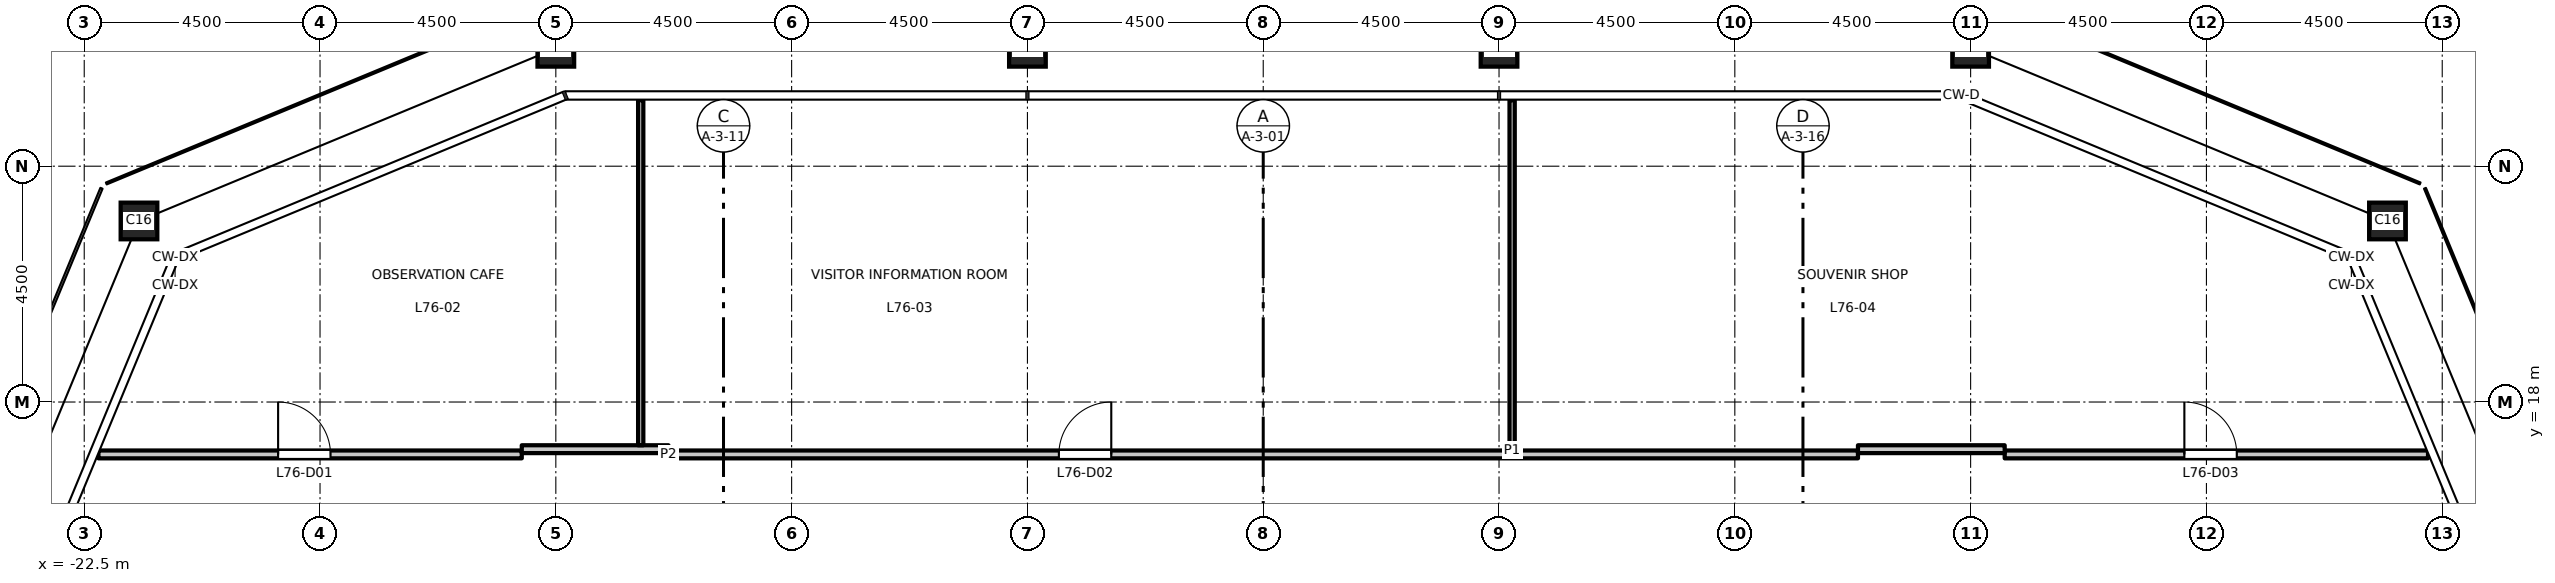
"""IFC4 building model, lengths in metres.
Left out: names, types, materials, properties, quantities, classifications, styles, units other than length and angle.
Written with IfcOpenShell. Run it as: python <this file> out.ifc"""

import sys

from ifc_helpers import new_model, si_unit, direction, frame, frame_2d, origin, origin_2d, place, context, subcontext, project, spatial, rectangle, hollow_rectangle, extrude, element, fill, save


model = new_model("IFC4")
c1 = context("Model", 3, precision=1e-05, world=origin(), true_north=direction((0.0, 1.0)))
c2 = subcontext(c1, "Body", "Model", "MODEL_VIEW")
j1 = project(units=[si_unit("LENGTHUNIT", "METRE"), si_unit("PLANEANGLEUNIT", "RADIAN")], contexts=[c1])
p1 = place(None, origin())
s1 = spatial("IfcSite", under=j1, at=p1, CompositionType="ELEMENT")
p2 = place(p1, origin())
s2 = spatial("IfcBuilding", under=s1, at=p2, CompositionType="ELEMENT")
p3 = place(p2, frame((0.0, 0.0, 353.2)))
s3 = spatial("IfcBuildingStorey", under=s2, at=p3, CompositionType="ELEMENT", Elevation=353.2)
for number, where, z_axis, x_axis in (
    (1, (21.455, 21.455, 0.0), (0.0, 0.0, 1.0), (1.0, 0.0, 0.0)),
    (2, (13.5, 24.75, 0.0), (0.0, 0.0, 1.0), (1.0, 0.0, 0.0)),
    (3, (4.5, 24.75, 0.0), (0.0, 0.0, 1.0), (1.0, 0.0, 0.0)),
    (4, (-4.5, 24.75, 0.0), (0.0, 0.0, 1.0), (1.0, 0.0, 0.0)),
    (5, (-13.5, 24.75, 0.0), (0.0, 0.0, 1.0), (1.0, 0.0, 0.0)),
    (6, (-21.455, 21.455, 0.0), (0.0, 0.0, 1.0), (1.0, 0.0, 0.0)),
):
    element("IfcColumn", number, at=place(p3, frame(where, z_axis=z_axis, x_axis=x_axis)), inside=s3, PredefinedType="COLUMN", context=c2, shape_type="SweptSolid", body=[
        extrude(hollow_rectangle(XDim=0.7, YDim=0.7, WallThickness=0.036, at=origin_2d()), origin(), (0.0, 0.0, 1.0), 5.0),
    ])
p4 = place(p3, frame((-22.229, 17.0, 0.0), z_axis=(0.0, 0.0, 1.0), x_axis=(1.0, 0.0, 0.0)))
e7 = element("IfcWall", 7, at=p4, inside=s3, PredefinedType="PARTITIONING", context=c2, shape_type="SweptSolid", body=[
    extrude(rectangle(XDim=8.079, YDim=0.15, at=frame_2d((4.04, 0.0))), origin(), (0.0, 0.0, 1.0), 4.8),
])
p5 = place(p4, frame((3.429, 0.0, 0.0)))
e8 = element("IfcOpeningElement", 8, at=p5, cuts=e7, PredefinedType="OPENING", context=c2, shape_type="SweptSolid", body=[
    extrude(rectangle(XDim=1.0, YDim=2.1, at=frame_2d((0.5, 1.05))), frame((0.0, 0.085, 0.0), z_axis=(0.0, -1.0, 0.0), x_axis=(1.0, 0.0, 0.0)), (0.0, 0.0, 1.0), 0.17),
])
p6 = place(p3, frame((-11.35, 17.0, 0.0), z_axis=(0.0, 0.0, 1.0), x_axis=(1.0, 0.0, 0.0)))
e9 = element("IfcWall", 9, at=p6, inside=s3, PredefinedType="PARTITIONING", context=c2, shape_type="SweptSolid", body=[
    extrude(rectangle(XDim=22.7, YDim=0.15, at=frame_2d((11.35, 0.0))), origin(), (0.0, 0.0, 1.0), 4.8),
])
p7 = place(p6, frame((7.45, 0.0, 0.0)))
e10 = element("IfcOpeningElement", 10, at=p7, cuts=e9, PredefinedType="OPENING", context=c2, shape_type="SweptSolid", body=[
    extrude(rectangle(XDim=1.0, YDim=2.1, at=frame_2d((0.5, 1.05))), frame((0.0, 0.085, 0.0), z_axis=(0.0, -1.0, 0.0), x_axis=(1.0, 0.0, 0.0)), (0.0, 0.0, 1.0), 0.17),
])
p8 = place(p3, frame((14.15, 17.0, 0.0), z_axis=(0.0, 0.0, 1.0), x_axis=(1.0, 0.0, 0.0)))
e11 = element("IfcWall", 11, at=p8, inside=s3, PredefinedType="PARTITIONING", context=c2, shape_type="SweptSolid", body=[
    extrude(rectangle(XDim=8.079, YDim=0.15, at=frame_2d((4.04, 0.0))), origin(), (0.0, 0.0, 1.0), 4.8),
])
p9 = place(p8, frame((3.429, 0.0, 0.0)))
e12 = element("IfcOpeningElement", 12, at=p9, cuts=e11, PredefinedType="OPENING", context=c2, shape_type="SweptSolid", body=[
    extrude(rectangle(XDim=1.0, YDim=2.1, at=frame_2d((0.5, 1.05))), frame((0.0, 0.085, 0.0), z_axis=(0.0, -1.0, 0.0), x_axis=(1.0, 0.0, 0.0)), (0.0, 0.0, 1.0), 0.17),
])
for number, where, z_axis, x_axis in (
    (13, (-14.15, 17.1, 0.0), (0.0, 0.0, 1.0), (1.0, 0.0, 0.0)),
    (14, (11.35, 17.1, 0.0), (0.0, 0.0, 1.0), (1.0, 0.0, 0.0)),
):
    element("IfcWall", number, at=place(p3, frame(where, z_axis=z_axis, x_axis=x_axis)), inside=s3, PredefinedType="PARTITIONING", context=c2, shape_type="SweptSolid", body=[
        extrude(rectangle(XDim=2.8, YDim=0.15, at=frame_2d((1.4, 0.0))), origin(), (0.0, 0.0, 1.0), 4.8),
    ])
p10 = place(p3, frame((-11.88, 17.175, 0.0), z_axis=(0.0, 0.0, 1.0), x_axis=(0.0, 1.0, 0.0)))
e15 = element("IfcWall", 15, at=p10, inside=s3, PredefinedType="PARTITIONING", context=c2, shape_type="SweptSolid", body=[
    extrude(rectangle(XDim=6.585, YDim=0.1, at=frame_2d((3.292, 0.0))), origin(), (0.0, 0.0, 1.0), 4.8),
])
p11 = place(p3, frame((4.75, 17.075, 0.0), z_axis=(0.0, 0.0, 1.0), x_axis=(0.0, 1.0, 0.0)))
e16 = element("IfcWall", 16, at=p11, inside=s3, PredefinedType="PARTITIONING", context=c2, shape_type="SweptSolid", body=[
    extrude(rectangle(XDim=6.685, YDim=0.1, at=frame_2d((3.343, 0.0))), origin(), (0.0, 0.0, 1.0), 4.8),
])
p12 = place(p5, origin())
e17 = element("IfcDoor", 17, at=p12, inside=s3, OperationType="SINGLE_SWING_LEFT", PredefinedType="DOOR", context=c2, shape_type="SweptSolid", body=[
    extrude(rectangle(XDim=1.0, YDim=2.1, at=frame_2d((0.5, 1.05))), frame((0.0, 0.025, 0.0), z_axis=(0.0, -1.0, 0.0), x_axis=(1.0, 0.0, 0.0)), (0.0, 0.0, 1.0), 0.05),
])
fill(e8, e17)
p13 = place(p7, origin())
e18 = element("IfcDoor", 18, at=p13, inside=s3, OperationType="SINGLE_SWING_RIGHT", PredefinedType="DOOR", context=c2, shape_type="SweptSolid", body=[
    extrude(rectangle(XDim=1.0, YDim=2.1, at=frame_2d((0.5, 1.05))), frame((0.0, 0.025, 0.0), z_axis=(0.0, -1.0, 0.0), x_axis=(1.0, 0.0, 0.0)), (0.0, 0.0, 1.0), 0.05),
])
fill(e10, e18)
p14 = place(p9, origin())
e19 = element("IfcDoor", 19, at=p14, inside=s3, OperationType="SINGLE_SWING_LEFT", PredefinedType="DOOR", context=c2, shape_type="SweptSolid", body=[
    extrude(rectangle(XDim=1.0, YDim=2.1, at=frame_2d((0.5, 1.05))), frame((0.0, 0.025, 0.0), z_axis=(0.0, -1.0, 0.0), x_axis=(1.0, 0.0, 0.0)), (0.0, 0.0, 1.0), 0.05),
])
fill(e12, e19)
save(model, sys.argv[1])
